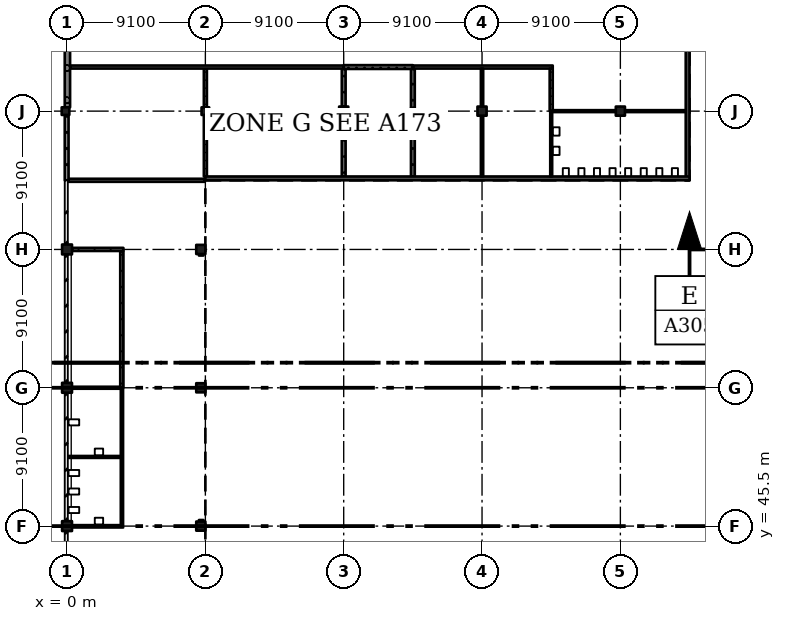
"""IFC4 building model, lengths in metres.
Left out: names, types, materials, properties, quantities, classifications, styles, units other than length and angle.
Written with IfcOpenShell. Run it as: python <this file> out.ifc"""

import sys

from ifc_helpers import new_model, si_unit, direction, frame, frame_2d, origin, origin_2d, place, context, subcontext, project, spatial, rectangle, extrude, element, fill, save


model = new_model("IFC4")
c1 = context("Model", 3, precision=1e-05, world=origin(), true_north=direction((0.0, 1.0)))
c2 = subcontext(c1, "Body", "Model", "MODEL_VIEW")
j1 = project(units=[si_unit("LENGTHUNIT", "METRE"), si_unit("PLANEANGLEUNIT", "RADIAN")], contexts=[c1])
p1 = place(None, origin())
s1 = spatial("IfcSite", under=j1, at=p1, CompositionType="ELEMENT")
p2 = place(p1, origin())
s2 = spatial("IfcBuilding", under=s1, at=p2, CompositionType="ELEMENT")
p3 = place(p2, frame((0.0, 0.0, 24.57)))
s3 = spatial("IfcBuildingStorey", under=s2, at=p3, CompositionType="ELEMENT", Elevation=24.57)
for number, where, z_axis, x_axis in (
    (1, (0.0, 45.5, 0.0), (0.0, 0.0, 1.0), (1.0, 0.0, 0.0)),
    (2, (0.0, 54.6, 0.0), (0.0, 0.0, 1.0), (1.0, 0.0, 0.0)),
    (3, (0.0, 63.7, 0.0), (0.0, 0.0, 1.0), (1.0, 0.0, 0.0)),
):
    element("IfcColumn", number, at=place(p3, frame(where, z_axis=z_axis, x_axis=x_axis)), inside=s3, PredefinedType="COLUMN", context=c2, shape_type="SweptSolid", body=[
        extrude(rectangle(XDim=0.65, YDim=0.65, at=origin_2d()), origin(), (0.0, 0.0, 1.0), 4.55),
    ])
p4 = place(p3, frame((-0.1, 72.8, 0.0), z_axis=(0.0, 0.0, 1.0), x_axis=(1.0, 0.0, 0.0)))
e4 = element("IfcColumn", 4, at=p4, inside=s3, PredefinedType="COLUMN", context=c2, shape_type="SweptSolid", body=[
    extrude(rectangle(XDim=0.5, YDim=0.5, at=origin_2d()), origin(), (0.0, 0.0, 1.0), 4.55),
])
for number, where, z_axis, x_axis in (
    (5, (8.8, 45.5, 0.0), (0.0, 0.0, 1.0), (1.0, 0.0, 0.0)),
    (6, (8.8, 54.6, 0.0), (0.0, 0.0, 1.0), (1.0, 0.0, 0.0)),
    (7, (8.8, 63.7, 0.0), (0.0, 0.0, 1.0), (1.0, 0.0, 0.0)),
):
    element("IfcColumn", number, at=place(p3, frame(where, z_axis=z_axis, x_axis=x_axis)), inside=s3, PredefinedType="COLUMN", context=c2, shape_type="SweptSolid", body=[
        extrude(rectangle(XDim=0.6, YDim=0.6, at=origin_2d()), origin(), (0.0, 0.0, 1.0), 4.55),
    ])
p5 = place(p3, frame((9.1, 72.8, 0.0), z_axis=(0.0, 0.0, 1.0), x_axis=(1.0, 0.0, 0.0)))
e8 = element("IfcColumn", 8, at=p5, inside=s3, PredefinedType="COLUMN", context=c2, shape_type="SweptSolid", body=[
    extrude(rectangle(XDim=0.5, YDim=0.5, at=origin_2d()), origin(), (0.0, 0.0, 1.0), 4.55),
])
for number, where, z_axis, x_axis in (
    (9, (18.2, 72.8, 0.0), (0.0, 0.0, 1.0), (1.0, 0.0, 0.0)),
    (10, (27.3, 72.8, 0.0), (0.0, 0.0, 1.0), (1.0, 0.0, 0.0)),
    (11, (36.4, 72.8, 0.0), (0.0, 0.0, 1.0), (1.0, 0.0, 0.0)),
):
    element("IfcColumn", number, at=place(p3, frame(where, z_axis=z_axis, x_axis=x_axis)), inside=s3, PredefinedType="COLUMN", context=c2, shape_type="SweptSolid", body=[
        extrude(rectangle(XDim=0.6, YDim=0.6, at=origin_2d()), origin(), (0.0, 0.0, 1.0), 4.55),
    ])
p6 = place(p3, frame((40.825, 68.25, 0.0), z_axis=(0.0, 0.0, 1.0), x_axis=(0.0, 1.0, 0.0)))
e12 = element("IfcWall", 12, at=p6, inside=s3, PredefinedType="SHEAR", context=c2, shape_type="SweptSolid", body=[
    extrude(rectangle(XDim=31.85, YDim=0.25, at=frame_2d((15.925, 0.0))), origin(), (0.0, 0.0, 1.0), 4.55),
])
p7 = place(p3, frame((40.95, 68.375, 0.0), z_axis=(0.0, 0.0, 1.0), x_axis=(-1.0, 0.0, 0.0)))
e13 = element("IfcWall", 13, at=p7, inside=s3, PredefinedType="SHEAR", context=c2, shape_type="SweptSolid", body=[
    extrude(rectangle(XDim=31.85, YDim=0.25, at=frame_2d((15.925, 0.0))), origin(), (0.0, 0.0, 1.0), 4.55),
])
p8 = place(p3, frame((0.025, 81.65, 0.0), z_axis=(0.0, 0.0, 1.0), x_axis=(0.0, -1.0, 0.0)))
e14 = element("IfcWall", 14, at=p8, inside=s3, PredefinedType="SOLIDWALL", context=c2, shape_type="SweptSolid", body=[
    extrude(rectangle(XDim=8.6, YDim=0.35, at=frame_2d((4.3, 0.0))), origin(), (0.0, 0.0, 1.0), 3.6),
])
p9 = place(p3, frame((-0.025, 72.55, 0.0), z_axis=(0.0, 0.0, 1.0), x_axis=(0.0, -1.0, 0.0)))
e15 = element("IfcWall", 15, at=p9, inside=s3, PredefinedType="SOLIDWALL", context=c2, shape_type="SweptSolid", body=[
    extrude(rectangle(XDim=4.3, YDim=0.25, at=frame_2d((2.15, 0.0))), origin(), (0.0, 0.0, 1.0), 3.6),
])
p10 = place(p3, frame((0.03, 50.05, 0.0), z_axis=(0.0, 0.0, 1.0), x_axis=(1.0, 0.0, 0.0)))
e16 = element("IfcWall", 16, at=p10, inside=s3, PredefinedType="PARTITIONING", context=c2, shape_type="SweptSolid", body=[
    extrude(rectangle(XDim=3.508, YDim=0.125, at=frame_2d((1.754, 0.0))), origin(), (0.0, 0.0, 1.0), 3.9),
])
p11 = place(p3, frame((0.325, 45.5, 0.0), z_axis=(0.0, 0.0, 1.0), x_axis=(1.0, 0.0, 0.0)))
e17 = element("IfcWall", 17, at=p11, inside=s3, PredefinedType="PARTITIONING", context=c2, shape_type="SweptSolid", body=[
    extrude(rectangle(XDim=3.338, YDim=0.125, at=frame_2d((1.669, 0.0))), origin(), (0.0, 0.0, 1.0), 3.9),
])
p12 = place(p3, frame((0.325, 54.6, 0.0), z_axis=(0.0, 0.0, 1.0), x_axis=(1.0, 0.0, 0.0)))
e18 = element("IfcWall", 18, at=p12, inside=s3, PredefinedType="PARTITIONING", context=c2, shape_type="SweptSolid", body=[
    extrude(rectangle(XDim=3.175, YDim=0.125, at=frame_2d((1.587, 0.0))), origin(), (0.0, 0.0, 1.0), 3.9),
])
p13 = place(p3, frame((3.6, 45.562, 0.0), z_axis=(0.0, 0.0, 1.0), x_axis=(0.0, 1.0, 0.0)))
e19 = element("IfcWall", 19, at=p13, inside=s3, PredefinedType="PARTITIONING", context=c2, shape_type="SweptSolid", body=[
    extrude(rectangle(XDim=9.038, YDim=0.125, at=frame_2d((4.519, 0.0))), origin(), (0.0, 0.0, 1.0), 3.9),
])
p14 = place(p13, frame((1.75, 0.0, 0.0)))
e20 = element("IfcOpeningElement", 20, at=p14, cuts=e19, PredefinedType="OPENING", context=c2, shape_type="SweptSolid", body=[
    extrude(rectangle(XDim=0.9, YDim=2.1, at=frame_2d((0.45, 1.05))), frame((0.0, 0.073, 0.0), z_axis=(0.0, -1.0, 0.0), x_axis=(1.0, 0.0, 0.0)), (0.0, 0.0, 1.0), 0.145),
])
p15 = place(p13, frame((6.238, 0.0, 0.0)))
e21 = element("IfcOpeningElement", 21, at=p15, cuts=e19, PredefinedType="OPENING", context=c2, shape_type="SweptSolid", body=[
    extrude(rectangle(XDim=1.0, YDim=2.1, at=frame_2d((0.5, 1.05))), frame((0.0, 0.073, 0.0), z_axis=(0.0, -1.0, 0.0), x_axis=(1.0, 0.0, 0.0)), (0.0, 0.0, 1.0), 0.145),
])
p16 = place(p3, frame((3.6, 54.6, 0.0), z_axis=(0.0, 0.0, 1.0), x_axis=(0.0, 1.0, 0.0)))
e22 = element("IfcWall", 22, at=p16, inside=s3, PredefinedType="PARTITIONING", context=c2, shape_type="SweptSolid", body=[
    extrude(rectangle(XDim=9.0, YDim=0.2, at=frame_2d((4.5, 0.0))), origin(), (0.0, 0.0, 1.0), 3.9),
])
p17 = place(p16, frame((3.55, 0.0, 0.0)))
e23 = element("IfcOpeningElement", 23, at=p17, cuts=e22, PredefinedType="OPENING", context=c2, shape_type="SweptSolid", body=[
    extrude(rectangle(XDim=1.8, YDim=2.1, at=frame_2d((0.9, 1.05))), frame((0.0, 0.11, 0.0), z_axis=(0.0, -1.0, 0.0), x_axis=(1.0, 0.0, 0.0)), (0.0, 0.0, 1.0), 0.22),
])
p18 = place(p3, frame((0.1, 68.25, 0.0), z_axis=(0.0, 0.0, 1.0), x_axis=(1.0, 0.0, 0.0)))
e24 = element("IfcWall", 24, at=p18, inside=s3, PredefinedType="PARTITIONING", context=c2, shape_type="SweptSolid", body=[
    extrude(rectangle(XDim=8.97, YDim=0.2, at=frame_2d((4.485, 0.0))), origin(), (0.0, 0.0, 1.0), 3.55),
])
p19 = place(p18, frame((4.72, 0.0, 0.0)))
e25 = element("IfcOpeningElement", 25, at=p19, cuts=e24, PredefinedType="OPENING", context=c2, shape_type="SweptSolid", body=[
    extrude(rectangle(XDim=3.0, YDim=2.4, at=frame_2d((1.5, 1.2))), frame((0.0, 0.11, 0.0), z_axis=(0.0, -1.0, 0.0), x_axis=(1.0, 0.0, 0.0)), (0.0, 0.0, 1.0), 0.22),
])
p20 = place(p18, frame((0.25, 0.0, 0.0)))
e26 = element("IfcOpeningElement", 26, at=p20, cuts=e24, PredefinedType="OPENING", context=c2, shape_type="SweptSolid", body=[
    extrude(rectangle(XDim=3.0, YDim=2.4, at=frame_2d((1.5, 1.2))), frame((0.0, 0.11, 0.0), z_axis=(0.0, -1.0, 0.0), x_axis=(1.0, 0.0, 0.0)), (0.0, 0.0, 1.0), 0.22),
])
p21 = place(p3, frame((3.7, 63.7, 0.0), z_axis=(0.0, 0.0, 1.0), x_axis=(-1.0, 0.0, 0.0)))
e27 = element("IfcWall", 27, at=p21, inside=s3, PredefinedType="PARTITIONING", context=c2, shape_type="SweptSolid", body=[
    extrude(rectangle(XDim=3.375, YDim=0.2, at=frame_2d((1.688, 0.0))), origin(), (0.0, 0.0, 1.0), 3.9),
])
for number, where, z_axis, x_axis in (
    (28, (8.675, 63.4, 0.0), (0.0, 0.0, 1.0), (1.0, 0.0, 0.0)),
    (29, (8.975, 45.8, 0.0), (0.0, 0.0, 1.0), (-1.0, 0.0, 0.0)),
):
    element("IfcWall", number, at=place(p3, frame(where, z_axis=z_axis, x_axis=x_axis)), inside=s3, PredefinedType="PARTITIONING", context=c2, shape_type="SweptSolid", body=[
        extrude(rectangle(XDim=0.3, YDim=0.2, at=frame_2d((0.15, 0.0))), origin(), (0.0, 0.0, 1.0), 8.43),
    ])
p22 = place(p3, frame((9.1, 68.5, 0.0), z_axis=(0.0, 0.0, 1.0), x_axis=(0.0, 1.0, 0.0)))
e30 = element("IfcWall", 30, at=p22, inside=s3, PredefinedType="PARTITIONING", context=c2, shape_type="SweptSolid", body=[
    extrude(rectangle(XDim=4.05, YDim=0.2, at=frame_2d((2.025, 0.0))), origin(), (0.0, 0.0, 1.0), 3.6),
])
p23 = place(p3, frame((9.1, 73.05, 0.0), z_axis=(0.0, 0.0, 1.0), x_axis=(0.0, 1.0, 0.0)))
e31 = element("IfcWall", 31, at=p23, inside=s3, PredefinedType="PARTITIONING", context=c2, shape_type="SweptSolid", body=[
    extrude(rectangle(XDim=2.55, YDim=0.2, at=frame_2d((1.275, 0.0))), origin(), (0.0, 0.0, 1.0), 3.6),
])
p24 = place(p3, frame((0.2, 75.7, 0.0), z_axis=(0.0, 0.0, 1.0), x_axis=(1.0, 0.0, 0.0)))
e32 = element("IfcWall", 32, at=p24, inside=s3, PredefinedType="PARTITIONING", context=c2, shape_type="SweptSolid", body=[
    extrude(rectangle(XDim=18.0, YDim=0.2, at=frame_2d((9.0, 0.0))), origin(), (0.0, 0.0, 1.0), 4.35),
])
p25 = place(p24, frame((12.55, 0.0, 0.0)))
e33 = element("IfcOpeningElement", 33, at=p25, cuts=e32, PredefinedType="OPENING", context=c2, shape_type="SweptSolid", body=[
    extrude(rectangle(XDim=1.8, YDim=2.1, at=frame_2d((0.9, 1.05))), frame((0.0, 0.11, 0.0), z_axis=(0.0, -1.0, 0.0), x_axis=(1.0, 0.0, 0.0)), (0.0, 0.0, 1.0), 0.22),
])
p26 = place(p24, frame((5.45, 0.0, 0.0)))
e34 = element("IfcOpeningElement", 34, at=p26, cuts=e32, PredefinedType="OPENING", context=c2, shape_type="SweptSolid", body=[
    extrude(rectangle(XDim=2.4, YDim=2.4, at=frame_2d((1.2, 1.2))), frame((0.0, 0.11, 0.0), z_axis=(0.0, -1.0, 0.0), x_axis=(1.0, 0.0, 0.0)), (0.0, 0.0, 1.0), 0.22),
])
p27 = place(p24, frame((1.05, 0.0, 0.0)))
e35 = element("IfcOpeningElement", 35, at=p27, cuts=e32, PredefinedType="OPENING", context=c2, shape_type="SweptSolid", body=[
    extrude(rectangle(XDim=2.4, YDim=2.4, at=frame_2d((1.2, 1.2))), frame((0.0, 0.11, 0.0), z_axis=(0.0, -1.0, 0.0), x_axis=(1.0, 0.0, 0.0)), (0.0, 0.0, 1.0), 0.22),
])
p28 = place(p3, frame((18.2, 72.5, 0.0), z_axis=(0.0, 0.0, 1.0), x_axis=(0.0, -1.0, 0.0)))
e36 = element("IfcWall", 36, at=p28, inside=s3, PredefinedType="SOLIDWALL", context=c2, shape_type="SweptSolid", body=[
    extrude(rectangle(XDim=4.0, YDim=0.25, at=frame_2d((2.0, 0.0))), origin(), (0.0, 0.0, 1.0), 4.35),
])
p29 = place(p3, frame((18.2, 75.575, 0.0), z_axis=(0.0, 0.0, 1.0), x_axis=(0.0, -1.0, 0.0)))
e37 = element("IfcWall", 37, at=p29, inside=s3, PredefinedType="SOLIDWALL", context=c2, shape_type="SweptSolid", body=[
    extrude(rectangle(XDim=2.475, YDim=0.25, at=frame_2d((1.237, 0.0))), origin(), (0.0, 0.0, 1.0), 3.6),
])
p30 = place(p3, frame((18.2, 75.7, 0.0), z_axis=(0.0, 0.0, 1.0), x_axis=(1.0, 0.0, 0.0)))
e38 = element("IfcWall", 38, at=p30, inside=s3, PredefinedType="SOLIDWALL", context=c2, shape_type="SweptSolid", body=[
    extrude(rectangle(XDim=4.55, YDim=0.25, at=frame_2d((2.275, 0.0))), origin(), (0.0, 0.0, 1.0), 4.35),
])
p31 = place(p30, frame((1.75, 0.0, 0.0)))
e39 = element("IfcOpeningElement", 39, at=p31, cuts=e38, PredefinedType="OPENING", context=c2, shape_type="SweptSolid", body=[
    extrude(rectangle(XDim=1.0, YDim=2.1, at=frame_2d((0.5, 1.05))), frame((0.0, 0.135, 0.0), z_axis=(0.0, -1.0, 0.0), x_axis=(1.0, 0.0, 0.0)), (0.0, 0.0, 1.0), 0.27),
])
p32 = place(p3, frame((22.75, 75.575, 0.0), z_axis=(0.0, 0.0, 1.0), x_axis=(0.0, -1.0, 0.0)))
e40 = element("IfcWall", 40, at=p32, inside=s3, PredefinedType="SOLIDWALL", context=c2, shape_type="SweptSolid", body=[
    extrude(rectangle(XDim=2.575, YDim=0.25, at=frame_2d((1.288, 0.0))), origin(), (0.0, 0.0, 1.0), 3.65),
])
p33 = place(p3, frame((22.75, 75.7, 0.0), z_axis=(0.0, 0.0, 1.0), x_axis=(1.0, 0.0, 0.0)))
e41 = element("IfcWall", 41, at=p33, inside=s3, PredefinedType="PARTITIONING", context=c2, shape_type="SweptSolid", body=[
    extrude(rectangle(XDim=9.2, YDim=0.2, at=frame_2d((4.6, 0.0))), origin(), (0.0, 0.0, 1.0), 4.35),
])
p34 = place(p33, frame((1.75, 0.0, 0.0)))
e42 = element("IfcOpeningElement", 42, at=p34, cuts=e41, PredefinedType="OPENING", context=c2, shape_type="SweptSolid", body=[
    extrude(rectangle(XDim=1.0, YDim=2.1, at=frame_2d((0.5, 1.05))), frame((0.0, 0.11, 0.0), z_axis=(0.0, -1.0, 0.0), x_axis=(1.0, 0.0, 0.0)), (0.0, 0.0, 1.0), 0.22),
])
p35 = place(p33, frame((6.3, 0.0, 0.0)))
e43 = element("IfcOpeningElement", 43, at=p35, cuts=e41, PredefinedType="OPENING", context=c2, shape_type="SweptSolid", body=[
    extrude(rectangle(XDim=1.2, YDim=2.1, at=frame_2d((0.6, 1.05))), frame((0.0, 0.11, 0.0), z_axis=(0.0, -1.0, 0.0), x_axis=(1.0, 0.0, 0.0)), (0.0, 0.0, 1.0), 0.22),
])
p36 = place(p3, frame((27.3, 72.5, 0.0), z_axis=(0.0, 0.0, 1.0), x_axis=(0.0, -1.0, 0.0)))
e44 = element("IfcWall", 44, at=p36, inside=s3, PredefinedType="PARTITIONING", context=c2, shape_type="SweptSolid", body=[
    extrude(rectangle(XDim=4.0, YDim=0.15, at=frame_2d((2.0, 0.0))), origin(), (0.0, 0.0, 1.0), 4.35),
])
p37 = place(p3, frame((27.3, 75.6, 0.0), z_axis=(0.0, 0.0, 1.0), x_axis=(0.0, -1.0, 0.0)))
e45 = element("IfcWall", 45, at=p37, inside=s3, PredefinedType="PARTITIONING", context=c2, shape_type="SweptSolid", body=[
    extrude(rectangle(XDim=2.5, YDim=0.15, at=frame_2d((1.25, 0.0))), origin(), (0.0, 0.0, 1.0), 3.6),
])
p38 = place(p3, frame((31.85, 72.8, 0.0), z_axis=(0.0, 0.0, 1.0), x_axis=(0.0, -1.0, 0.0)))
e46 = element("IfcWall", 46, at=p38, inside=s3, PredefinedType="PARTITIONING", context=c2, shape_type="SweptSolid", body=[
    extrude(rectangle(XDim=4.3, YDim=0.125, at=frame_2d((2.15, 0.0))), origin(), (0.0, 0.0, 1.0), 4.35),
])
p39 = place(p3, frame((31.85, 75.6, 0.0), z_axis=(0.0, 0.0, 1.0), x_axis=(0.0, -1.0, 0.0)))
e47 = element("IfcWall", 47, at=p39, inside=s3, PredefinedType="PARTITIONING", context=c2, shape_type="SweptSolid", body=[
    extrude(rectangle(XDim=2.8, YDim=0.2, at=frame_2d((1.4, 0.0))), origin(), (0.0, 0.0, 1.0), 3.65),
])
p40 = place(p3, frame((31.95, 72.8, 0.0), z_axis=(0.0, 0.0, 1.0), x_axis=(1.0, 0.0, 0.0)))
e48 = element("IfcWall", 48, at=p40, inside=s3, PredefinedType="PARTITIONING", context=c2, shape_type="SweptSolid", body=[
    extrude(rectangle(XDim=4.15, YDim=0.125, at=frame_2d((2.075, 0.0))), origin(), (0.0, 0.0, 1.0), 3.6),
])
p41 = place(p40, frame((1.65, 0.0, 0.0)))
e49 = element("IfcOpeningElement", 49, at=p41, cuts=e48, PredefinedType="OPENING", context=c2, shape_type="SweptSolid", body=[
    extrude(rectangle(XDim=0.9, YDim=2.1, at=frame_2d((0.45, 1.05))), frame((0.0, 0.073, 0.0), z_axis=(0.0, -1.0, 0.0), x_axis=(1.0, 0.0, 0.0)), (0.0, 0.0, 1.0), 0.145),
])
p42 = place(p3, frame((36.7, 72.8, 0.0), z_axis=(0.0, 0.0, 1.0), x_axis=(1.0, 0.0, 0.0)))
e50 = element("IfcWall", 50, at=p42, inside=s3, PredefinedType="PARTITIONING", context=c2, shape_type="SweptSolid", body=[
    extrude(rectangle(XDim=4.0, YDim=0.125, at=frame_2d((2.0, 0.0))), origin(), (0.0, 0.0, 1.0), 4.35),
])
p43 = place(p3, frame((22.75, 73.0, 0.0), z_axis=(0.0, 0.0, 1.0), x_axis=(0.0, -1.0, 0.0)))
e51 = element("IfcWall", 51, at=p43, inside=s3, PredefinedType="SOLIDWALL", context=c2, shape_type="SweptSolid", body=[
    extrude(rectangle(XDim=4.5, YDim=0.25, at=frame_2d((2.25, 0.0))), origin(), (0.0, 0.0, 1.0), 4.35),
])
p44 = place(p25, origin())
e52 = element("IfcDoor", 52, at=p44, inside=s3, OperationType="DOUBLE_DOOR_SINGLE_SWING", PredefinedType="DOOR", context=c2, shape_type="SweptSolid", body=[
    extrude(rectangle(XDim=1.8, YDim=2.1, at=frame_2d((0.9, 1.05))), frame((0.0, 0.025, 0.0), z_axis=(0.0, -1.0, 0.0), x_axis=(1.0, 0.0, 0.0)), (0.0, 0.0, 1.0), 0.05),
])
fill(e33, e52)
p45 = place(p31, origin())
e53 = element("IfcDoor", 53, at=p45, inside=s3, OperationType="SINGLE_SWING_LEFT", PredefinedType="DOOR", context=c2, shape_type="SweptSolid", body=[
    extrude(rectangle(XDim=1.0, YDim=2.1, at=frame_2d((0.5, 1.05))), frame((0.0, 0.025, 0.0), z_axis=(0.0, -1.0, 0.0), x_axis=(1.0, 0.0, 0.0)), (0.0, 0.0, 1.0), 0.05),
])
fill(e39, e53)
p46 = place(p34, origin())
e54 = element("IfcDoor", 54, at=p46, inside=s3, OperationType="SINGLE_SWING_LEFT", PredefinedType="DOOR", context=c2, shape_type="SweptSolid", body=[
    extrude(rectangle(XDim=1.0, YDim=2.1, at=frame_2d((0.5, 1.05))), frame((0.0, 0.025, 0.0), z_axis=(0.0, -1.0, 0.0), x_axis=(1.0, 0.0, 0.0)), (0.0, 0.0, 1.0), 0.05),
])
fill(e42, e54)
p47 = place(p35, origin())
e55 = element("IfcDoor", 55, at=p47, inside=s3, OperationType="SINGLE_SWING_RIGHT", PredefinedType="DOOR", context=c2, shape_type="SweptSolid", body=[
    extrude(rectangle(XDim=1.2, YDim=2.1, at=frame_2d((0.6, 1.05))), frame((0.0, 0.025, 0.0), z_axis=(0.0, -1.0, 0.0), x_axis=(1.0, 0.0, 0.0)), (0.0, 0.0, 1.0), 0.05),
])
fill(e43, e55)
p48 = place(p41, origin())
e56 = element("IfcDoor", 56, at=p48, inside=s3, OperationType="SINGLE_SWING_RIGHT", PredefinedType="DOOR", context=c2, shape_type="SweptSolid", body=[
    extrude(rectangle(XDim=0.9, YDim=2.1, at=frame_2d((0.45, 1.05))), frame((0.0, 0.025, 0.0), z_axis=(0.0, -1.0, 0.0), x_axis=(1.0, 0.0, 0.0)), (0.0, 0.0, 1.0), 0.05),
])
fill(e49, e56)
p49 = place(p14, origin())
e57 = element("IfcDoor", 57, at=p49, inside=s3, OperationType="SINGLE_SWING_RIGHT", PredefinedType="DOOR", context=c2, shape_type="SweptSolid", body=[
    extrude(rectangle(XDim=0.9, YDim=2.1, at=frame_2d((0.45, 1.05))), frame((0.0, 0.025, 0.0), z_axis=(0.0, -1.0, 0.0), x_axis=(1.0, 0.0, 0.0)), (0.0, 0.0, 1.0), 0.05),
])
fill(e20, e57)
p50 = place(p15, origin())
e58 = element("IfcDoor", 58, at=p50, inside=s3, OperationType="SINGLE_SWING_RIGHT", PredefinedType="DOOR", context=c2, shape_type="SweptSolid", body=[
    extrude(rectangle(XDim=1.0, YDim=2.1, at=frame_2d((0.5, 1.05))), frame((0.0, 0.025, 0.0), z_axis=(0.0, -1.0, 0.0), x_axis=(1.0, 0.0, 0.0)), (0.0, 0.0, 1.0), 0.05),
])
fill(e21, e58)
p51 = place(p17, origin())
e59 = element("IfcDoor", 59, at=p51, inside=s3, OperationType="DOUBLE_DOOR_SINGLE_SWING", PredefinedType="DOOR", context=c2, shape_type="SweptSolid", body=[
    extrude(rectangle(XDim=1.8, YDim=2.1, at=frame_2d((0.9, 1.05))), frame((0.0, 0.025, 0.0), z_axis=(0.0, -1.0, 0.0), x_axis=(1.0, 0.0, 0.0)), (0.0, 0.0, 1.0), 0.05),
])
fill(e23, e59)
p52 = place(p26, origin())
e60 = element("IfcDoor", 60, at=p52, inside=s3, OperationType="DOUBLE_DOOR_SINGLE_SWING", PredefinedType="DOOR", context=c2, shape_type="SweptSolid", body=[
    extrude(rectangle(XDim=2.4, YDim=2.4, at=frame_2d((1.2, 1.2))), frame((0.0, 0.025, 0.0), z_axis=(0.0, -1.0, 0.0), x_axis=(1.0, 0.0, 0.0)), (0.0, 0.0, 1.0), 0.05),
])
fill(e34, e60)
p53 = place(p27, origin())
e61 = element("IfcDoor", 61, at=p53, inside=s3, OperationType="DOUBLE_DOOR_SINGLE_SWING", PredefinedType="DOOR", context=c2, shape_type="SweptSolid", body=[
    extrude(rectangle(XDim=2.4, YDim=2.4, at=frame_2d((1.2, 1.2))), frame((0.0, 0.025, 0.0), z_axis=(0.0, -1.0, 0.0), x_axis=(1.0, 0.0, 0.0)), (0.0, 0.0, 1.0), 0.05),
])
fill(e35, e61)
p54 = place(p19, origin())
e62 = element("IfcDoor", 62, at=p54, inside=s3, OperationType="DOUBLE_DOOR_SINGLE_SWING", PredefinedType="DOOR", context=c2, shape_type="SweptSolid", body=[
    extrude(rectangle(XDim=3.0, YDim=2.4, at=frame_2d((1.5, 1.2))), frame((0.0, 0.025, 0.0), z_axis=(0.0, -1.0, 0.0), x_axis=(1.0, 0.0, 0.0)), (0.0, 0.0, 1.0), 0.05),
])
fill(e25, e62)
p55 = place(p20, origin())
e63 = element("IfcDoor", 63, at=p55, inside=s3, OperationType="DOUBLE_DOOR_SINGLE_SWING", PredefinedType="DOOR", context=c2, shape_type="SweptSolid", body=[
    extrude(rectangle(XDim=3.0, YDim=2.4, at=frame_2d((1.5, 1.2))), frame((0.0, 0.025, 0.0), z_axis=(0.0, -1.0, 0.0), x_axis=(1.0, 0.0, 0.0)), (0.0, 0.0, 1.0), 0.05),
])
fill(e26, e63)
save(model, sys.argv[1])
